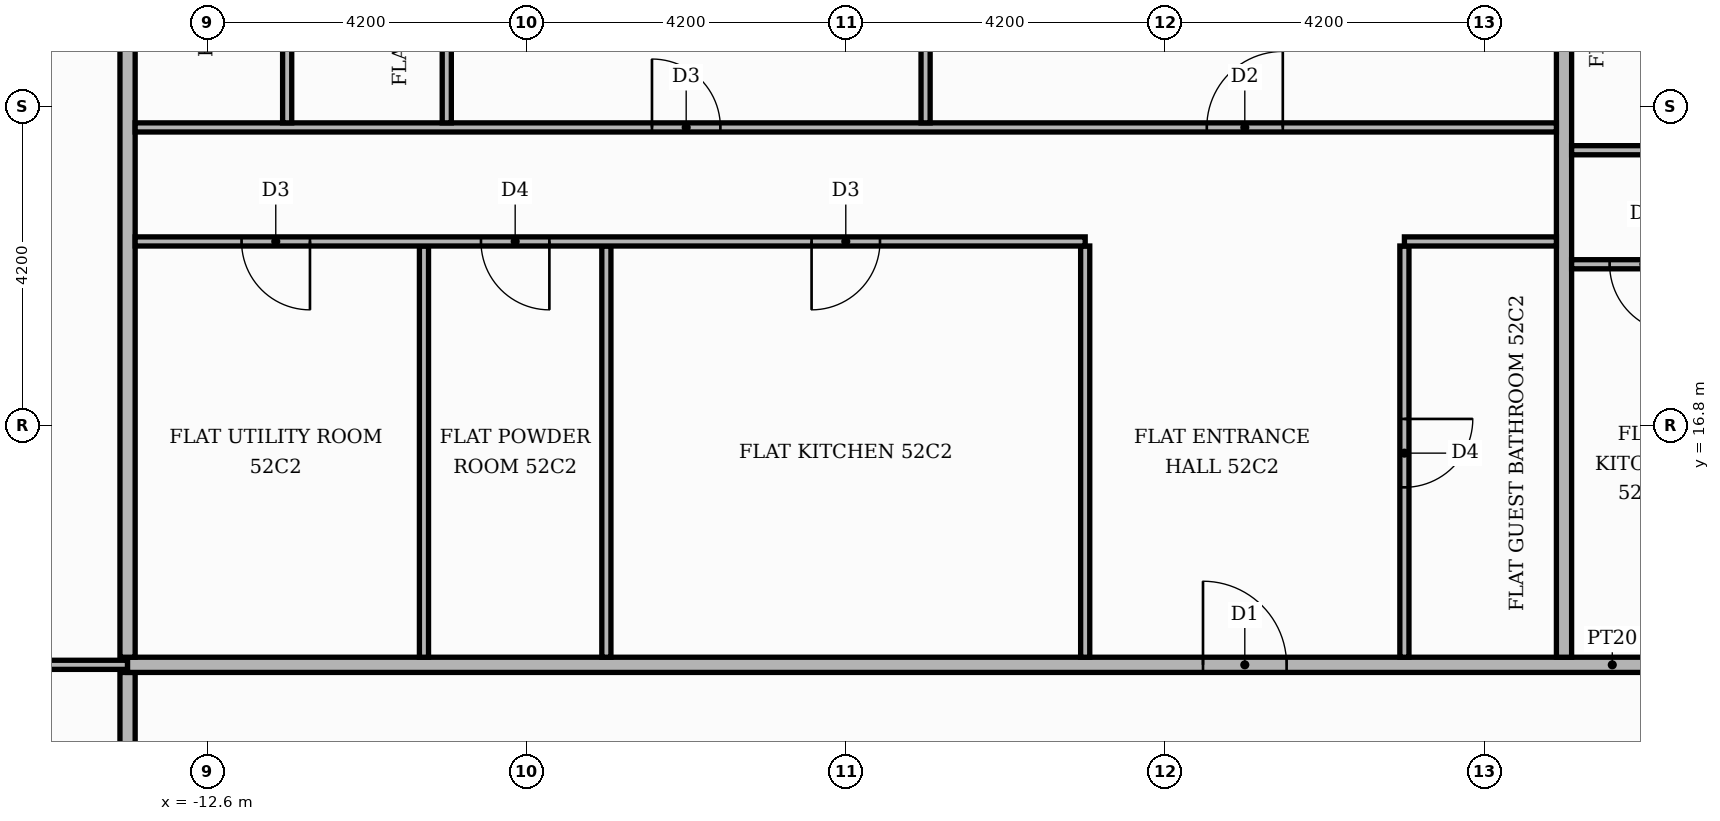
"""IFC4 building model, lengths in metres.
Left out: names, types, materials, properties, quantities, classifications, styles, units other than length and angle.
Written with IfcOpenShell. Run it as: python <this file> out.ifc"""

import sys

from ifc_helpers import new_model, si_unit, direction, frame, frame_2d, origin, place, context, subcontext, project, spatial, rectangle, extrude, element, fill, save


model = new_model("IFC4")
c1 = context("Model", 3, precision=1e-05, world=origin(), true_north=direction((0.0, 1.0)))
c2 = subcontext(c1, "Body", "Model", "MODEL_VIEW")
j1 = project(units=[si_unit("LENGTHUNIT", "METRE"), si_unit("PLANEANGLEUNIT", "RADIAN")], contexts=[c1])
p1 = place(None, origin())
s1 = spatial("IfcSite", under=j1, at=p1, CompositionType="ELEMENT")
p2 = place(p1, origin())
s2 = spatial("IfcBuilding", under=s1, at=p2, CompositionType="ELEMENT")
p3 = place(p2, frame((0.0, 0.0, 219.6)))
s3 = spatial("IfcBuildingStorey", under=s2, at=p3, CompositionType="ELEMENT", Elevation=219.6)
p4 = place(p3, frame((-13.65, -13.55, 0.0), z_axis=(0.0, 0.0, 1.0), x_axis=(0.0, 1.0, 0.0)))
e1 = element("IfcWall", 1, at=p4, inside=s3, PredefinedType="PARTITIONING", context=c2, shape_type="SweptSolid", body=[
    extrude(rectangle(XDim=27.1, YDim=0.2, at=frame_2d((13.55, 0.0))), origin(), (0.0, 0.0, 1.0), 3.48),
])
p5 = place(p4, frame((23.5, 0.0, 0.0)))
e2 = element("IfcOpeningElement", 2, at=p5, cuts=e1, PredefinedType="OPENING", context=c2, shape_type="SweptSolid", body=[
    extrude(rectangle(XDim=1.1, YDim=2.4, at=frame_2d((0.55, 1.2))), frame((0.0, 0.11, 0.0), z_axis=(0.0, -1.0, 0.0), x_axis=(1.0, 0.0, 0.0)), (0.0, 0.0, 1.0), 0.22),
])
p6 = place(p3, frame((-19.82, 13.65, 0.0), z_axis=(0.0, 0.0, 1.0), x_axis=(1.0, 0.0, 0.0)))
e3 = element("IfcWall", 3, at=p6, inside=s3, PredefinedType="PARTITIONING", context=c2, shape_type="SweptSolid", body=[
    extrude(rectangle(XDim=6.17, YDim=0.12, at=frame_2d((3.085, 0.0))), origin(), (0.0, 0.0, 1.0), 3.48),
])
p7 = place(p6, frame((2.635, 0.0, 0.0)))
e4 = element("IfcOpeningElement", 4, at=p7, cuts=e3, PredefinedType="OPENING", context=c2, shape_type="SweptSolid", body=[
    extrude(rectangle(XDim=0.9, YDim=2.1, at=frame_2d((0.45, 1.05))), frame((0.0, 0.07, 0.0), z_axis=(0.0, -1.0, 0.0), x_axis=(1.0, 0.0, 0.0)), (0.0, 0.0, 1.0), 0.14),
])
p8 = place(p3, frame((-13.65, 13.65, 0.0), z_axis=(0.0, 0.0, 1.0), x_axis=(1.0, 0.0, 0.0)))
e5 = element("IfcWall", 5, at=p8, inside=s3, PredefinedType="PARTITIONING", context=c2, shape_type="SweptSolid", body=[
    extrude(rectangle(XDim=39.07, YDim=0.2, at=frame_2d((19.535, 0.0))), origin(), (0.0, 0.0, 1.0), 3.48),
])
p9 = place(p8, frame((24.65, 0.0, 0.0)))
e6 = element("IfcOpeningElement", 6, at=p9, cuts=e5, PredefinedType="OPENING", context=c2, shape_type="SweptSolid", body=[
    extrude(rectangle(XDim=1.1, YDim=2.4, at=frame_2d((0.55, 1.2))), frame((0.0, 0.11, 0.0), z_axis=(0.0, -1.0, 0.0), x_axis=(1.0, 0.0, 0.0)), (0.0, 0.0, 1.0), 0.22),
])
p10 = place(p8, frame((14.15, 0.0, 0.0)))
e7 = element("IfcOpeningElement", 7, at=p10, cuts=e5, PredefinedType="OPENING", context=c2, shape_type="SweptSolid", body=[
    extrude(rectangle(XDim=1.1, YDim=2.4, at=frame_2d((0.55, 1.2))), frame((0.0, 0.11, 0.0), z_axis=(0.0, -1.0, 0.0), x_axis=(1.0, 0.0, 0.0)), (0.0, 0.0, 1.0), 0.22),
])
p11 = place(p3, frame((-13.65, 13.75, 0.0), z_axis=(0.0, 0.0, 1.0), x_axis=(0.0, 1.0, 0.0)))
e8 = element("IfcWall", 8, at=p11, inside=s3, PredefinedType="PARTITIONING", context=c2, shape_type="SweptSolid", body=[
    extrude(rectangle(XDim=11.67, YDim=0.2, at=frame_2d((5.835, 0.0))), origin(), (0.0, 0.0, 1.0), 3.48),
])
for number, where, z_axis, x_axis in (
    (9, (-9.75, 13.75, 0.0), (0.0, 0.0, 1.0), (0.0, 1.0, 0.0)),
    (10, (-7.35, 13.75, 0.0), (0.0, 0.0, 1.0), (0.0, 1.0, 0.0)),
    (11, (-1.05, 13.75, 0.0), (0.0, 0.0, 1.0), (0.0, 1.0, 0.0)),
):
    element("IfcWall", number, at=place(p3, frame(where, z_axis=z_axis, x_axis=x_axis)), inside=s3, PredefinedType="PARTITIONING", context=c2, shape_type="SweptSolid", body=[
        extrude(rectangle(XDim=5.41, YDim=0.12, at=frame_2d((2.705, 0.0))), origin(), (0.0, 0.0, 1.0), 3.48),
    ])
p12 = place(p3, frame((3.15, 13.75, 0.0), z_axis=(0.0, 0.0, 1.0), x_axis=(0.0, 1.0, 0.0)))
e12 = element("IfcWall", 12, at=p12, inside=s3, PredefinedType="PARTITIONING", context=c2, shape_type="SweptSolid", body=[
    extrude(rectangle(XDim=5.41, YDim=0.12, at=frame_2d((2.705, 0.0))), origin(), (0.0, 0.0, 1.0), 3.48),
])
p13 = place(p12, frame((2.235, 0.0, 0.0)))
e13 = element("IfcOpeningElement", 13, at=p13, cuts=e12, PredefinedType="OPENING", context=c2, shape_type="SweptSolid", body=[
    extrude(rectangle(XDim=0.9, YDim=2.1, at=frame_2d((0.45, 1.05))), frame((0.0, 0.07, 0.0), z_axis=(0.0, -1.0, 0.0), x_axis=(1.0, 0.0, 0.0)), (0.0, 0.0, 1.0), 0.14),
])
p14 = place(p3, frame((5.25, 13.75, 0.0), z_axis=(0.0, 0.0, 1.0), x_axis=(0.0, 1.0, 0.0)))
e14 = element("IfcWall", 14, at=p14, inside=s3, PredefinedType="PARTITIONING", context=c2, shape_type="SweptSolid", body=[
    extrude(rectangle(XDim=11.67, YDim=0.2, at=frame_2d((5.835, 0.0))), origin(), (0.0, 0.0, 1.0), 3.48),
])
p15 = place(p3, frame((5.35, 18.92, 0.0), z_axis=(0.0, 0.0, 1.0), x_axis=(1.0, 0.0, 0.0)))
e15 = element("IfcWall", 15, at=p15, inside=s3, PredefinedType="PARTITIONING", context=c2, shape_type="SweptSolid", body=[
    extrude(rectangle(XDim=4.1, YDim=0.12, at=frame_2d((2.05, 0.0))), origin(), (0.0, 0.0, 1.0), 3.48),
])
p16 = place(p15, frame((0.5, 0.0, 0.0)))
e16 = element("IfcOpeningElement", 16, at=p16, cuts=e15, PredefinedType="OPENING", context=c2, shape_type="SweptSolid", body=[
    extrude(rectangle(XDim=0.9, YDim=2.1, at=frame_2d((0.45, 1.05))), frame((0.0, 0.07, 0.0), z_axis=(0.0, -1.0, 0.0), x_axis=(1.0, 0.0, 0.0)), (0.0, 0.0, 1.0), 0.14),
])
p17 = place(p3, frame((-13.55, 19.22, 0.0), z_axis=(0.0, 0.0, 1.0), x_axis=(1.0, 0.0, 0.0)))
e17 = element("IfcWall", 17, at=p17, inside=s3, PredefinedType="PARTITIONING", context=c2, shape_type="SweptSolid", body=[
    extrude(rectangle(XDim=12.5, YDim=0.12, at=frame_2d((6.25, 0.0))), origin(), (0.0, 0.0, 1.0), 3.48),
])
p18 = place(p17, frame((8.9, 0.0, 0.0)))
e18 = element("IfcOpeningElement", 18, at=p18, cuts=e17, PredefinedType="OPENING", context=c2, shape_type="SweptSolid", body=[
    extrude(rectangle(XDim=0.9, YDim=2.1, at=frame_2d((0.45, 1.05))), frame((0.0, 0.07, 0.0), z_axis=(0.0, -1.0, 0.0), x_axis=(1.0, 0.0, 0.0)), (0.0, 0.0, 1.0), 0.14),
])
p19 = place(p17, frame((4.55, 0.0, 0.0)))
e19 = element("IfcOpeningElement", 19, at=p19, cuts=e17, PredefinedType="OPENING", context=c2, shape_type="SweptSolid", body=[
    extrude(rectangle(XDim=0.9, YDim=2.1, at=frame_2d((0.45, 1.05))), frame((0.0, 0.07, 0.0), z_axis=(0.0, -1.0, 0.0), x_axis=(1.0, 0.0, 0.0)), (0.0, 0.0, 1.0), 0.14),
])
p20 = place(p17, frame((1.4, 0.0, 0.0)))
e20 = element("IfcOpeningElement", 20, at=p20, cuts=e17, PredefinedType="OPENING", context=c2, shape_type="SweptSolid", body=[
    extrude(rectangle(XDim=0.9, YDim=2.1, at=frame_2d((0.45, 1.05))), frame((0.0, 0.07, 0.0), z_axis=(0.0, -1.0, 0.0), x_axis=(1.0, 0.0, 0.0)), (0.0, 0.0, 1.0), 0.14),
])
p21 = place(p3, frame((3.15, 19.22, 0.0), z_axis=(0.0, 0.0, 1.0), x_axis=(1.0, 0.0, 0.0)))
e21 = element("IfcWall", 21, at=p21, inside=s3, PredefinedType="PARTITIONING", context=c2, shape_type="SweptSolid", body=[
    extrude(rectangle(XDim=2.0, YDim=0.12, at=frame_2d((1.0, 0.0))), origin(), (0.0, 0.0, 1.0), 3.48),
])
p22 = place(p3, frame((5.35, 20.42, 0.0), z_axis=(0.0, 0.0, 1.0), x_axis=(1.0, 0.0, 0.0)))
e22 = element("IfcWall", 22, at=p22, inside=s3, PredefinedType="PARTITIONING", context=c2, shape_type="SweptSolid", body=[
    extrude(rectangle(XDim=15.869, YDim=0.12, at=frame_2d((7.935, 0.0))), origin(), (0.0, 0.0, 1.0), 3.48),
])
p23 = place(p22, frame((8.85, 0.0, 0.0)))
e23 = element("IfcOpeningElement", 23, at=p23, cuts=e22, PredefinedType="OPENING", context=c2, shape_type="SweptSolid", body=[
    extrude(rectangle(XDim=1.0, YDim=2.1, at=frame_2d((0.5, 1.05))), frame((0.0, 0.07, 0.0), z_axis=(0.0, -1.0, 0.0), x_axis=(1.0, 0.0, 0.0)), (0.0, 0.0, 1.0), 0.14),
])
p24 = place(p22, frame((5.75, 0.0, 0.0)))
e24 = element("IfcOpeningElement", 24, at=p24, cuts=e22, PredefinedType="OPENING", context=c2, shape_type="SweptSolid", body=[
    extrude(rectangle(XDim=0.9, YDim=2.1, at=frame_2d((0.45, 1.05))), frame((0.0, 0.07, 0.0), z_axis=(0.0, -1.0, 0.0), x_axis=(1.0, 0.0, 0.0)), (0.0, 0.0, 1.0), 0.14),
])
p25 = place(p3, frame((-13.55, 20.72, 0.0), z_axis=(0.0, 0.0, 1.0), x_axis=(1.0, 0.0, 0.0)))
e25 = element("IfcWall", 25, at=p25, inside=s3, PredefinedType="PARTITIONING", context=c2, shape_type="SweptSolid", body=[
    extrude(rectangle(XDim=18.7, YDim=0.12, at=frame_2d((9.35, 0.0))), origin(), (0.0, 0.0, 1.0), 3.48),
])
p26 = place(p25, frame((14.1, 0.0, 0.0)))
e26 = element("IfcOpeningElement", 26, at=p26, cuts=e25, PredefinedType="OPENING", context=c2, shape_type="SweptSolid", body=[
    extrude(rectangle(XDim=1.0, YDim=2.1, at=frame_2d((0.5, 1.05))), frame((0.0, 0.07, 0.0), z_axis=(0.0, -1.0, 0.0), x_axis=(1.0, 0.0, 0.0)), (0.0, 0.0, 1.0), 0.14),
])
p27 = place(p25, frame((6.8, 0.0, 0.0)))
e27 = element("IfcOpeningElement", 27, at=p27, cuts=e25, PredefinedType="OPENING", context=c2, shape_type="SweptSolid", body=[
    extrude(rectangle(XDim=0.9, YDim=2.1, at=frame_2d((0.45, 1.05))), frame((0.0, 0.07, 0.0), z_axis=(0.0, -1.0, 0.0), x_axis=(1.0, 0.0, 0.0)), (0.0, 0.0, 1.0), 0.14),
])
p28 = place(p3, frame((-11.55, 20.78, 0.0), z_axis=(0.0, 0.0, 1.0), x_axis=(0.0, 1.0, 0.0)))
e28 = element("IfcWall", 28, at=p28, inside=s3, PredefinedType="PARTITIONING", context=c2, shape_type="SweptSolid", body=[
    extrude(rectangle(XDim=4.64, YDim=0.12, at=frame_2d((2.32, 0.0))), origin(), (0.0, 0.0, 1.0), 3.48),
])
p29 = place(p28, frame((1.99, 0.0, 0.0)))
e29 = element("IfcOpeningElement", 29, at=p29, cuts=e28, PredefinedType="OPENING", context=c2, shape_type="SweptSolid", body=[
    extrude(rectangle(XDim=0.9, YDim=2.1, at=frame_2d((0.45, 1.05))), frame((0.0, 0.07, 0.0), z_axis=(0.0, -1.0, 0.0), x_axis=(1.0, 0.0, 0.0)), (0.0, 0.0, 1.0), 0.14),
])
p30 = place(p3, frame((-9.45, 20.78, 0.0), z_axis=(0.0, 0.0, 1.0), x_axis=(0.0, 1.0, 0.0)))
e30 = element("IfcWall", 30, at=p30, inside=s3, PredefinedType="PARTITIONING", context=c2, shape_type="SweptSolid", body=[
    extrude(rectangle(XDim=4.64, YDim=0.12, at=frame_2d((2.32, 0.0))), origin(), (0.0, 0.0, 1.0), 3.48),
])
p31 = place(p30, frame((1.99, 0.0, 0.0)))
e31 = element("IfcOpeningElement", 31, at=p31, cuts=e30, PredefinedType="OPENING", context=c2, shape_type="SweptSolid", body=[
    extrude(rectangle(XDim=0.9, YDim=2.1, at=frame_2d((0.45, 1.05))), frame((0.0, 0.07, 0.0), z_axis=(0.0, -1.0, 0.0), x_axis=(1.0, 0.0, 0.0)), (0.0, 0.0, 1.0), 0.14),
])
p32 = place(p3, frame((-3.15, 20.78, 0.0), z_axis=(0.0, 0.0, 1.0), x_axis=(0.0, 1.0, 0.0)))
e32 = element("IfcWall", 32, at=p32, inside=s3, PredefinedType="PARTITIONING", context=c2, shape_type="SweptSolid", body=[
    extrude(rectangle(XDim=4.64, YDim=0.12, at=frame_2d((2.32, 0.0))), origin(), (0.0, 0.0, 1.0), 3.48),
])
p33 = place(p16, frame((0.9, 0.0, 0.0), z_axis=(0.0, 0.0, 1.0), x_axis=(-1.0, 0.0, 0.0)))
e33 = element("IfcDoor", 33, at=p33, inside=s3, OperationType="SINGLE_SWING_RIGHT", PredefinedType="DOOR", context=c2, shape_type="SweptSolid", body=[
    extrude(rectangle(XDim=0.9, YDim=2.1, at=frame_2d((0.45, 1.05))), frame((0.0, 0.025, 0.0), z_axis=(0.0, -1.0, 0.0), x_axis=(1.0, 0.0, 0.0)), (0.0, 0.0, 1.0), 0.05),
])
fill(e16, e33)
p34 = place(p10, origin())
e34 = element("IfcDoor", 34, at=p34, inside=s3, OperationType="SINGLE_SWING_LEFT", PredefinedType="DOOR", context=c2, shape_type="SweptSolid", body=[
    extrude(rectangle(XDim=1.1, YDim=2.4, at=frame_2d((0.55, 1.2))), frame((0.0, 0.025, 0.0), z_axis=(0.0, -1.0, 0.0), x_axis=(1.0, 0.0, 0.0)), (0.0, 0.0, 1.0), 0.05),
])
fill(e7, e34)
p35 = place(p13, frame((0.9, 0.0, 0.0), z_axis=(0.0, 0.0, 1.0), x_axis=(-1.0, 0.0, 0.0)))
e35 = element("IfcDoor", 35, at=p35, inside=s3, OperationType="SINGLE_SWING_RIGHT", PredefinedType="DOOR", context=c2, shape_type="SweptSolid", body=[
    extrude(rectangle(XDim=0.9, YDim=2.1, at=frame_2d((0.45, 1.05))), frame((0.0, 0.025, 0.0), z_axis=(0.0, -1.0, 0.0), x_axis=(1.0, 0.0, 0.0)), (0.0, 0.0, 1.0), 0.05),
])
fill(e13, e35)
p36 = place(p18, frame((0.9, 0.0, 0.0), z_axis=(0.0, 0.0, 1.0), x_axis=(-1.0, 0.0, 0.0)))
e36 = element("IfcDoor", 36, at=p36, inside=s3, OperationType="SINGLE_SWING_LEFT", PredefinedType="DOOR", context=c2, shape_type="SweptSolid", body=[
    extrude(rectangle(XDim=0.9, YDim=2.1, at=frame_2d((0.45, 1.05))), frame((0.0, 0.025, 0.0), z_axis=(0.0, -1.0, 0.0), x_axis=(1.0, 0.0, 0.0)), (0.0, 0.0, 1.0), 0.05),
])
fill(e18, e36)
p37 = place(p19, frame((0.9, 0.0, 0.0), z_axis=(0.0, 0.0, 1.0), x_axis=(-1.0, 0.0, 0.0)))
e37 = element("IfcDoor", 37, at=p37, inside=s3, OperationType="SINGLE_SWING_RIGHT", PredefinedType="DOOR", context=c2, shape_type="SweptSolid", body=[
    extrude(rectangle(XDim=0.9, YDim=2.1, at=frame_2d((0.45, 1.05))), frame((0.0, 0.025, 0.0), z_axis=(0.0, -1.0, 0.0), x_axis=(1.0, 0.0, 0.0)), (0.0, 0.0, 1.0), 0.05),
])
fill(e19, e37)
p38 = place(p20, frame((0.9, 0.0, 0.0), z_axis=(0.0, 0.0, 1.0), x_axis=(-1.0, 0.0, 0.0)))
e38 = element("IfcDoor", 38, at=p38, inside=s3, OperationType="SINGLE_SWING_RIGHT", PredefinedType="DOOR", context=c2, shape_type="SweptSolid", body=[
    extrude(rectangle(XDim=0.9, YDim=2.1, at=frame_2d((0.45, 1.05))), frame((0.0, 0.025, 0.0), z_axis=(0.0, -1.0, 0.0), x_axis=(1.0, 0.0, 0.0)), (0.0, 0.0, 1.0), 0.05),
])
fill(e20, e38)
p39 = place(p26, origin())
e39 = element("IfcDoor", 39, at=p39, inside=s3, OperationType="SINGLE_SWING_RIGHT", PredefinedType="DOOR", context=c2, shape_type="SweptSolid", body=[
    extrude(rectangle(XDim=1.0, YDim=2.1, at=frame_2d((0.5, 1.05))), frame((0.0, 0.025, 0.0), z_axis=(0.0, -1.0, 0.0), x_axis=(1.0, 0.0, 0.0)), (0.0, 0.0, 1.0), 0.05),
])
fill(e26, e39)
p40 = place(p27, origin())
e40 = element("IfcDoor", 40, at=p40, inside=s3, OperationType="SINGLE_SWING_LEFT", PredefinedType="DOOR", context=c2, shape_type="SweptSolid", body=[
    extrude(rectangle(XDim=0.9, YDim=2.1, at=frame_2d((0.45, 1.05))), frame((0.0, 0.025, 0.0), z_axis=(0.0, -1.0, 0.0), x_axis=(1.0, 0.0, 0.0)), (0.0, 0.0, 1.0), 0.05),
])
fill(e27, e40)
save(model, sys.argv[1])
